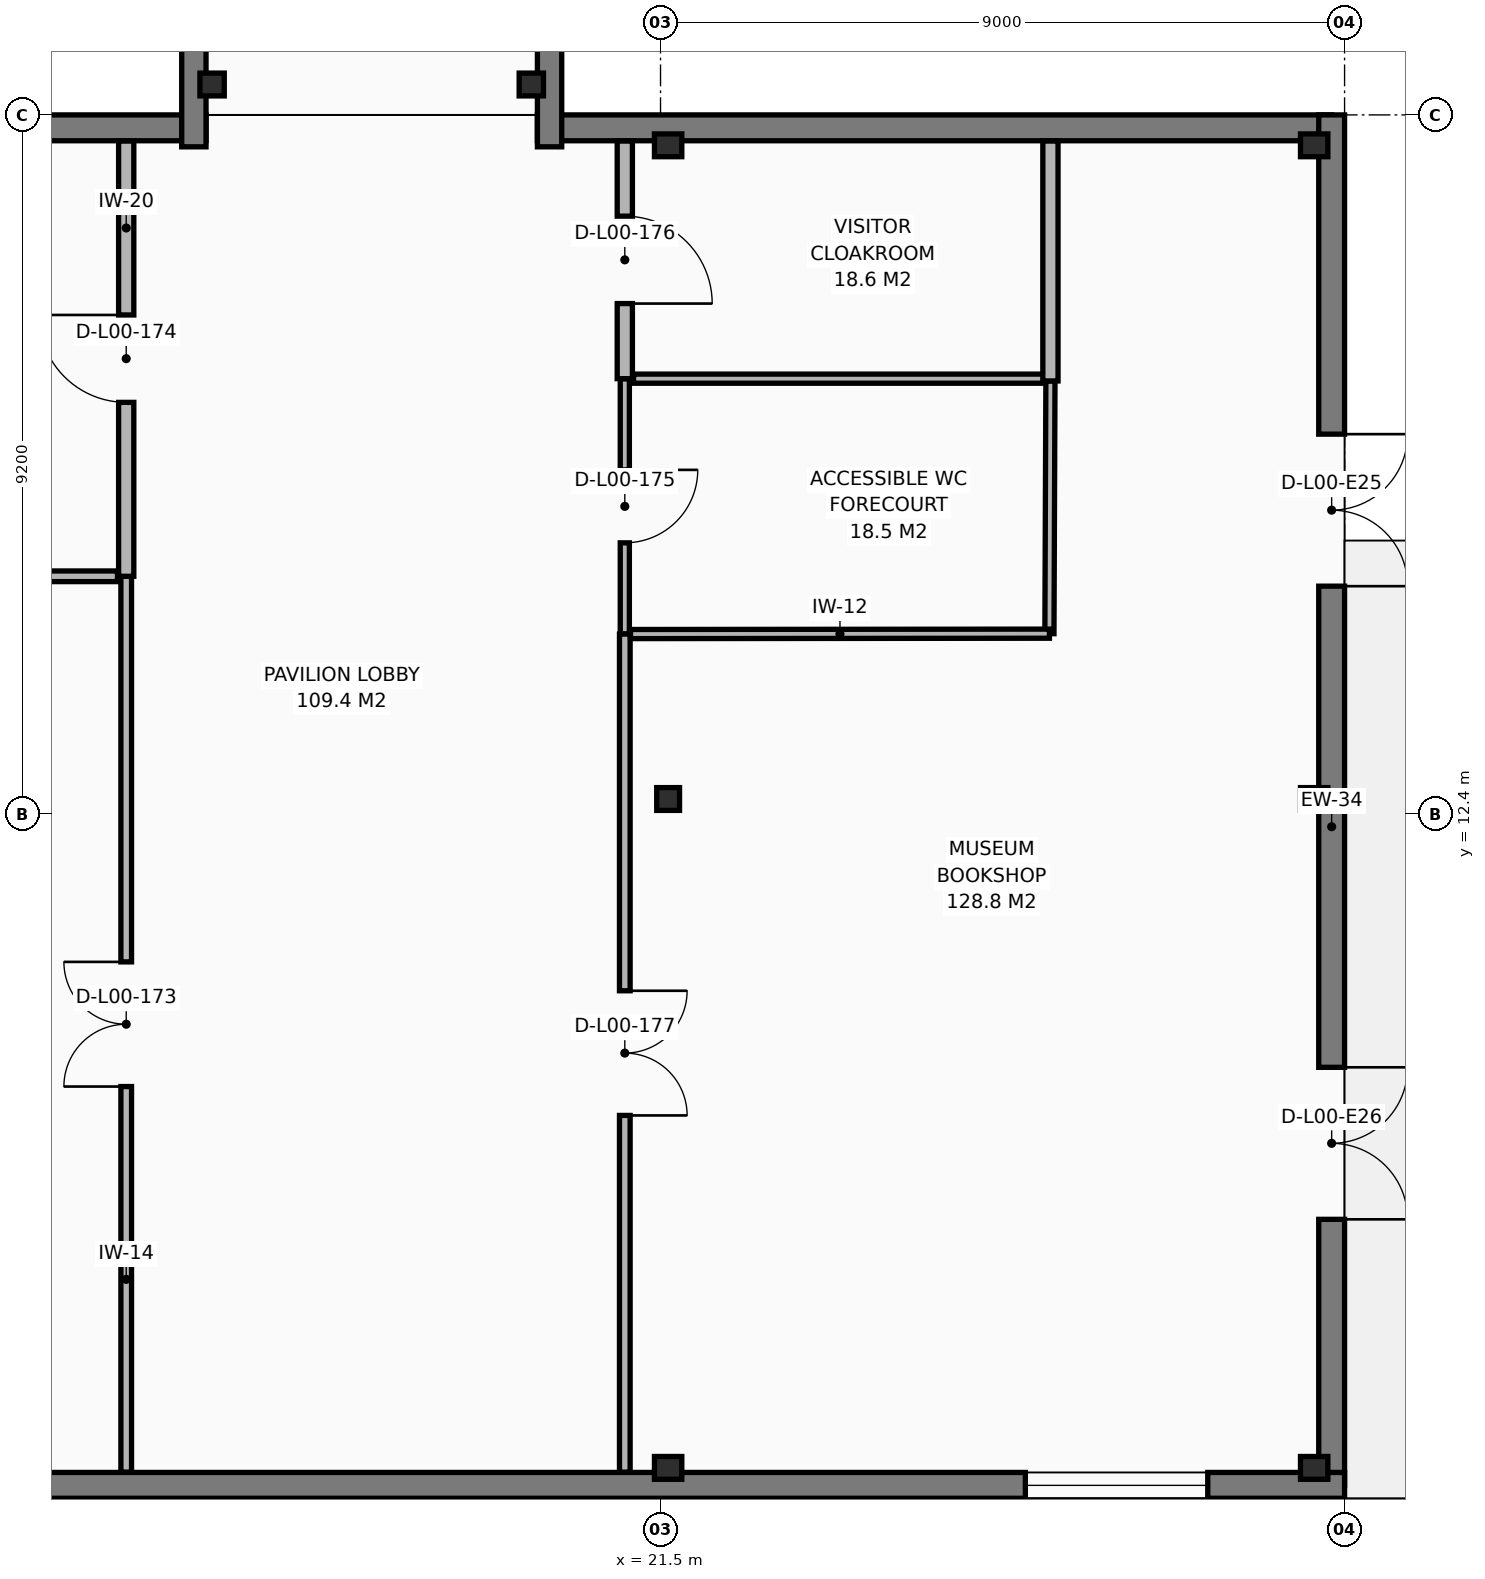
"""IFC4 building model, lengths in metres.
Left out: names, types, materials, properties, quantities, classifications, styles, units other than length and angle.
Written with IfcOpenShell. Run it as: python <this file> out.ifc"""

import sys

from ifc_helpers import new_model, si_unit, direction, frame, frame_2d, origin, origin_2d, place, context, subcontext, project, spatial, rectangle, i_section, extrude, element, fill, save


model = new_model("IFC4")
c1 = context("Model", 3, precision=1e-05, world=origin(), true_north=direction((0.0, 1.0)))
c2 = subcontext(c1, "Body", "Model", "MODEL_VIEW")
j1 = project(units=[si_unit("LENGTHUNIT", "METRE"), si_unit("PLANEANGLEUNIT", "RADIAN")], contexts=[c1])
p1 = place(None, origin())
s1 = spatial("IfcSite", under=j1, at=p1, CompositionType="ELEMENT")
p2 = place(p1, origin())
s2 = spatial("IfcBuilding", under=s1, at=p2, CompositionType="ELEMENT")
p3 = place(p2, origin())
s3 = spatial("IfcBuildingStorey", under=s2, at=p3, CompositionType="ELEMENT", Elevation=0.0)
p4 = place(p3, frame((21.6, 3.8, 0.0), z_axis=(0.0, 0.0, 1.0), x_axis=(1.0, 0.0, 0.0)))
e1 = element("IfcColumn", 1, at=p4, inside=s3, PredefinedType="COLUMN", context=c2, shape_type="SweptSolid", body=[
    extrude(i_section(OverallWidth=0.3, OverallDepth=0.36, WebThickness=0.012, FlangeThickness=0.022, FilletRadius=0.027, at=origin_2d()), origin(), (0.0, 0.0, 1.0), 5.1),
])
p5 = place(p3, frame((21.6, 12.6, 0.0), z_axis=(0.0, 0.0, 1.0), x_axis=(1.0, 0.0, 0.0)))
e2 = element("IfcColumn", 2, at=p5, inside=s3, PredefinedType="COLUMN", context=c2, shape_type="SweptSolid", body=[
    extrude(i_section(OverallWidth=0.3, OverallDepth=0.3, WebThickness=0.011, FlangeThickness=0.019, FilletRadius=0.027, at=origin_2d()), origin(), (0.0, 0.0, 1.0), 5.1),
])
for number, where, z_axis, x_axis in (
    (3, (21.6, 21.2, 0.0), (0.0, 0.0, 1.0), (1.0, 0.0, 0.0)),
    (4, (30.1, 3.8, 0.0), (0.0, 0.0, 1.0), (1.0, 0.0, 0.0)),
    (5, (30.1, 12.6, 0.0), (0.0, 0.0, 1.0), (1.0, 0.0, 0.0)),
    (6, (30.1, 21.2, 0.0), (0.0, 0.0, 1.0), (1.0, 0.0, 0.0)),
):
    element("IfcColumn", number, at=place(p3, frame(where, z_axis=z_axis, x_axis=x_axis)), inside=s3, PredefinedType="COLUMN", context=c2, shape_type="SweptSolid", body=[
        extrude(i_section(OverallWidth=0.3, OverallDepth=0.36, WebThickness=0.012, FlangeThickness=0.022, FilletRadius=0.027, at=origin_2d()), origin(), (0.0, 0.0, 1.0), 5.1),
    ])
for number, where, z_axis, x_axis in (
    (7, (15.6, 22.0, 0.0), (0.0, 0.0, 1.0), (1.0, 0.0, 0.0)),
    (8, (19.8, 22.0, 0.0), (0.0, 0.0, 1.0), (1.0, 0.0, 0.0)),
):
    element("IfcColumn", number, at=place(p3, frame(where, z_axis=z_axis, x_axis=x_axis)), inside=s3, PredefinedType="COLUMN", context=c2, shape_type="SweptSolid", body=[
        extrude(i_section(OverallWidth=0.3, OverallDepth=0.32, WebThickness=0.011, FlangeThickness=0.021, FilletRadius=0.027, at=origin_2d()), origin(), (0.0, 0.0, 1.0), 5.1),
    ])
p6 = place(p3, frame((3.6, 21.43, 0.0), z_axis=(0.0, 0.0, 1.0), x_axis=(1.0, 0.0, 0.0)))
e9 = element("IfcWall", 9, at=p6, inside=s3, PredefinedType="SOLIDWALL", context=c2, shape_type="SweptSolid", body=[
    extrude(rectangle(XDim=11.92, YDim=0.34, at=frame_2d((5.96, 0.0))), origin(), (0.0, 0.0, 1.0), 4.88),
])
p7 = place(p6, frame((1.8, 0.0, 0.85)))
e10 = element("IfcOpeningElement", 10, at=p7, cuts=e9, PredefinedType="OPENING", context=c2, shape_type="SweptSolid", body=[
    extrude(rectangle(XDim=2.4, YDim=1.5, at=frame_2d((1.2, 0.75))), frame((0.0, 0.18, 0.0), z_axis=(0.0, -1.0, 0.0), x_axis=(1.0, 0.0, 0.0)), (0.0, 0.0, 1.0), 0.36),
])
p8 = place(p3, frame((19.88, 21.43, 0.0), z_axis=(0.0, 0.0, 1.0), x_axis=(1.0, 0.0, 0.0)))
e11 = element("IfcWall", 11, at=p8, inside=s3, PredefinedType="SOLIDWALL", context=c2, shape_type="SweptSolid", body=[
    extrude(rectangle(XDim=10.45, YDim=0.34, at=frame_2d((5.225, 0.0))), origin(), (0.0, 0.0, 1.0), 4.88),
])
p9 = place(p3, frame((30.33, 21.6, 0.0), z_axis=(0.0, 0.0, 1.0), x_axis=(0.0, -1.0, 0.0)))
e12 = element("IfcWall", 12, at=p9, inside=s3, PredefinedType="SOLIDWALL", context=c2, shape_type="SweptSolid", body=[
    extrude(rectangle(XDim=18.03, YDim=0.34, at=frame_2d((9.015, 0.0))), origin(), (0.0, 0.0, 1.0), 4.88),
])
p10 = place(p9, frame((4.2, 0.0, 0.0)))
e13 = element("IfcOpeningElement", 13, at=p10, cuts=e12, PredefinedType="OPENING", context=c2, shape_type="SweptSolid", body=[
    extrude(rectangle(XDim=2.0, YDim=2.3, at=frame_2d((1.0, 1.15))), frame((0.0, 0.18, 0.0), z_axis=(0.0, -1.0, 0.0), x_axis=(1.0, 0.0, 0.0)), (0.0, 0.0, 1.0), 0.36),
])
p11 = place(p9, frame((12.53, 0.0, 0.0)))
e14 = element("IfcOpeningElement", 14, at=p11, cuts=e12, PredefinedType="OPENING", context=c2, shape_type="SweptSolid", body=[
    extrude(rectangle(XDim=2.0, YDim=2.3, at=frame_2d((1.0, 1.15))), frame((0.0, 0.18, 0.0), z_axis=(0.0, -1.0, 0.0), x_axis=(1.0, 0.0, 0.0)), (0.0, 0.0, 1.0), 0.36),
])
p12 = place(p3, frame((30.5, 3.57, 0.0), z_axis=(0.0, 0.0, 1.0), x_axis=(-1.0, 0.0, 0.0)))
e15 = element("IfcWall", 15, at=p12, inside=s3, PredefinedType="SOLIDWALL", context=c2, shape_type="SweptSolid", body=[
    extrude(rectangle(XDim=26.73, YDim=0.34, at=frame_2d((13.365, 0.0))), origin(), (0.0, 0.0, 1.0), 4.88),
])
p13 = place(p12, frame((1.8, 0.0, 0.85)))
e16 = element("IfcOpeningElement", 16, at=p13, cuts=e15, PredefinedType="OPENING", context=c2, shape_type="SweptSolid", body=[
    extrude(rectangle(XDim=2.4, YDim=1.5, at=frame_2d((1.2, 0.75))), frame((0.0, 0.18, 0.0), z_axis=(0.0, -1.0, 0.0), x_axis=(1.0, 0.0, 0.0)), (0.0, 0.0, 1.0), 0.36),
])
p14 = place(p3, frame((15.36, 21.18, 0.0), z_axis=(0.0, 0.0, 1.0), x_axis=(0.0, 1.0, 0.0)))
e17 = element("IfcWall", 17, at=p14, inside=s3, PredefinedType="SOLIDWALL", context=c2, shape_type="SweptSolid", body=[
    extrude(rectangle(XDim=18.565, YDim=0.32, at=frame_2d((9.283, 0.0))), origin(), (0.0, 0.0, 1.0), 4.82),
])
p15 = place(p14, frame((8.308, 0.0, 1.12)))
e18 = element("IfcOpeningElement", 18, at=p15, cuts=e17, PredefinedType="OPENING", context=c2, shape_type="SweptSolid", body=[
    extrude(rectangle(XDim=1.95, YDim=1.5, at=frame_2d((0.975, 0.75))), frame((0.0, 0.17, 0.0), z_axis=(0.0, -1.0, 0.0), x_axis=(1.0, 0.0, 0.0)), (0.0, 0.0, 1.0), 0.34),
])
p16 = place(p3, frame((20.04, 39.745, 0.0), z_axis=(0.0, 0.0, 1.0), x_axis=(0.0, -1.0, 0.0)))
e19 = element("IfcWall", 19, at=p16, inside=s3, PredefinedType="SOLIDWALL", context=c2, shape_type="SweptSolid", body=[
    extrude(rectangle(XDim=18.565, YDim=0.32, at=frame_2d((9.283, 0.0))), origin(), (0.0, 0.0, 1.0), 4.82),
])
p17 = place(p16, frame((8.308, 0.0, 1.12)))
e20 = element("IfcOpeningElement", 20, at=p17, cuts=e19, PredefinedType="OPENING", context=c2, shape_type="SweptSolid", body=[
    extrude(rectangle(XDim=1.95, YDim=1.5, at=frame_2d((0.975, 0.75))), frame((0.0, 0.17, 0.0), z_axis=(0.0, -1.0, 0.0), x_axis=(1.0, 0.0, 0.0)), (0.0, 0.0, 1.0), 0.34),
])
p18 = place(p3, frame((14.47, 3.744, 0.0), z_axis=(0.0, 0.0, 1.0), x_axis=(0.0, 1.0, 0.0)))
e21 = element("IfcWall", 21, at=p18, inside=s3, PredefinedType="PARTITIONING", context=c2, shape_type="SweptSolid", body=[
    extrude(rectangle(XDim=11.786, YDim=0.14, at=frame_2d((5.893, 0.0))), origin(), (0.0, 0.0, 1.0), 4.51),
])
p19 = place(p18, frame((5.073, 0.0, 0.0)))
e22 = element("IfcOpeningElement", 22, at=p19, cuts=e21, PredefinedType="OPENING", context=c2, shape_type="SweptSolid", body=[
    extrude(rectangle(XDim=1.64, YDim=2.2, at=frame_2d((0.82, 1.1))), frame((0.0, 0.08, 0.0), z_axis=(0.0, -1.0, 0.0), x_axis=(1.0, 0.0, 0.0)), (0.0, 0.0, 1.0), 0.16),
])
p20 = place(p3, frame((14.47, 15.53, 0.0), z_axis=(0.0, 0.0, 1.0), x_axis=(0.0, 1.0, 0.0)))
e23 = element("IfcWall", 23, at=p20, inside=s3, PredefinedType="PARTITIONING", context=c2, shape_type="SweptSolid", body=[
    extrude(rectangle(XDim=5.726, YDim=0.2, at=frame_2d((2.863, 0.0))), origin(), (0.0, 0.0, 1.0), 4.51),
])
p21 = place(p20, frame((2.288, 0.0, 0.0)))
e24 = element("IfcOpeningElement", 24, at=p21, cuts=e23, PredefinedType="OPENING", context=c2, shape_type="SweptSolid", body=[
    extrude(rectangle(XDim=1.15, YDim=2.15, at=frame_2d((0.575, 1.075))), frame((0.0, 0.11, 0.0), z_axis=(0.0, -1.0, 0.0), x_axis=(1.0, 0.0, 0.0)), (0.0, 0.0, 1.0), 0.22),
])
p22 = place(p3, frame((21.03, 18.13, 0.0), z_axis=(0.0, 0.0, 1.0), x_axis=(0.0, -1.0, 0.0)))
e25 = element("IfcWall", 25, at=p22, inside=s3, PredefinedType="PARTITIONING", context=c2, shape_type="SweptSolid", body=[
    extrude(rectangle(XDim=3.36, YDim=0.12, at=frame_2d((1.68, 0.0))), origin(), (0.0, 0.0, 1.0), 4.87),
])
p23 = place(p22, frame((1.2, 0.0, 0.0)))
e26 = element("IfcOpeningElement", 26, at=p23, cuts=e25, PredefinedType="OPENING", context=c2, shape_type="SweptSolid", body=[
    extrude(rectangle(XDim=0.96, YDim=2.1, at=frame_2d((0.48, 1.05))), frame((0.0, 0.07, 0.0), z_axis=(0.0, -1.0, 0.0), x_axis=(1.0, 0.0, 0.0)), (0.0, 0.0, 1.0), 0.14),
])
p24 = place(p3, frame((21.03, 21.256, 0.0), z_axis=(0.0, 0.0, 1.0), x_axis=(0.0, -1.0, 0.0)))
e27 = element("IfcWall", 27, at=p24, inside=s3, PredefinedType="PARTITIONING", context=c2, shape_type="SweptSolid", body=[
    extrude(rectangle(XDim=3.126, YDim=0.2, at=frame_2d((1.563, 0.0))), origin(), (0.0, 0.0, 1.0), 4.51),
])
p25 = place(p24, frame((0.988, 0.0, 0.0)))
e28 = element("IfcOpeningElement", 28, at=p25, cuts=e27, PredefinedType="OPENING", context=c2, shape_type="SweptSolid", body=[
    extrude(rectangle(XDim=1.15, YDim=2.15, at=frame_2d((0.575, 1.075))), frame((0.0, 0.11, 0.0), z_axis=(0.0, -1.0, 0.0), x_axis=(1.0, 0.0, 0.0)), (0.0, 0.0, 1.0), 0.22),
])
p26 = place(p3, frame((21.03, 14.77, 0.0), z_axis=(0.0, 0.0, 1.0), x_axis=(0.0, -1.0, 0.0)))
e29 = element("IfcWall", 29, at=p26, inside=s3, PredefinedType="PARTITIONING", context=c2, shape_type="SweptSolid", body=[
    extrude(rectangle(XDim=11.026, YDim=0.14, at=frame_2d((5.513, 0.0))), origin(), (0.0, 0.0, 1.0), 4.51),
])
p27 = place(p26, frame((4.693, 0.0, 0.0)))
e30 = element("IfcOpeningElement", 30, at=p27, cuts=e29, PredefinedType="OPENING", context=c2, shape_type="SweptSolid", body=[
    extrude(rectangle(XDim=1.64, YDim=2.2, at=frame_2d((0.82, 1.1))), frame((0.0, 0.08, 0.0), z_axis=(0.0, -1.0, 0.0), x_axis=(1.0, 0.0, 0.0)), (0.0, 0.0, 1.0), 0.16),
])
p28 = place(p3, frame((3.944, 15.53, 0.0), z_axis=(0.0, 0.0, 1.0), x_axis=(1.0, 0.0, 0.0)))
e31 = element("IfcWall", 31, at=p28, inside=s3, PredefinedType="PARTITIONING", context=c2, shape_type="SweptSolid", body=[
    extrude(rectangle(XDim=10.411, YDim=0.14, at=frame_2d((5.206, 0.0))), origin(), (0.0, 0.0, 1.0), 4.51),
])
p29 = place(p3, frame((21.145, 18.13, 0.0), z_axis=(0.0, 0.0, 1.0), x_axis=(1.0, 0.0, 0.0)))
e32 = element("IfcWall", 32, at=p29, inside=s3, PredefinedType="PARTITIONING", context=c2, shape_type="SweptSolid", body=[
    extrude(rectangle(XDim=5.455, YDim=0.12, at=frame_2d((2.728, 0.0))), origin(), (0.0, 0.0, 1.0), 4.57),
])
p30 = place(p3, frame((26.63, 18.1, 0.0), z_axis=(0.0, 0.0, 1.0), x_axis=(-0.003965017661, -0.999992139287, 0.0)))
e33 = element("IfcWall", 33, at=p30, inside=s3, PredefinedType="PARTITIONING", context=c2, shape_type="SweptSolid", body=[
    extrude(rectangle(XDim=3.325, YDim=0.12, at=frame_2d((1.663, 0.0))), origin(), (0.0, 0.0, 1.0), 4.87),
])
p31 = place(p3, frame((26.617, 14.775, 0.0), z_axis=(0.0, 0.0, 1.0), x_axis=(-0.999999567372, -0.000930190951, 0.0)))
e34 = element("IfcWall", 34, at=p31, inside=s3, PredefinedType="PARTITIONING", context=c2, shape_type="SweptSolid", body=[
    extrude(rectangle(XDim=5.512, YDim=0.12, at=frame_2d((2.756, 0.0))), origin(), (0.0, 0.0, 1.0), 4.57),
])
p32 = place(p3, frame((26.63, 21.256, 0.0), z_axis=(0.0, 0.0, 1.0), x_axis=(0.0, -1.0, 0.0)))
e35 = element("IfcWall", 35, at=p32, inside=s3, PredefinedType="PARTITIONING", context=c2, shape_type="SweptSolid", body=[
    extrude(rectangle(XDim=3.156, YDim=0.2, at=frame_2d((1.578, 0.0))), origin(), (0.0, 0.0, 1.0), 4.51),
])
p33 = place(p10, origin())
e36 = element("IfcDoor", 36, at=p33, inside=s3, OperationType="DOUBLE_DOOR_SINGLE_SWING", PredefinedType="DOOR", context=c2, shape_type="SweptSolid", body=[
    extrude(rectangle(XDim=2.0, YDim=2.3, at=frame_2d((1.0, 1.15))), frame((0.0, 0.025, 0.0), z_axis=(0.0, -1.0, 0.0), x_axis=(1.0, 0.0, 0.0)), (0.0, 0.0, 1.0), 0.05),
])
fill(e13, e36)
p34 = place(p11, origin())
e37 = element("IfcDoor", 37, at=p34, inside=s3, OperationType="DOUBLE_DOOR_SINGLE_SWING", PredefinedType="DOOR", context=c2, shape_type="SweptSolid", body=[
    extrude(rectangle(XDim=2.0, YDim=2.3, at=frame_2d((1.0, 1.15))), frame((0.0, 0.025, 0.0), z_axis=(0.0, -1.0, 0.0), x_axis=(1.0, 0.0, 0.0)), (0.0, 0.0, 1.0), 0.05),
])
fill(e14, e37)
p35 = place(p13, origin())
e38 = element("IfcWindow", 38, at=p35, inside=s3, PartitioningType="SINGLE_PANEL", PredefinedType="WINDOW", context=c2, shape_type="SweptSolid", body=[
    extrude(rectangle(XDim=2.4, YDim=1.5, at=frame_2d((1.2, 0.75))), frame((0.0, 0.03, 0.0), z_axis=(0.0, -1.0, 0.0), x_axis=(1.0, 0.0, 0.0)), (0.0, 0.0, 1.0), 0.06),
])
fill(e16, e38)
p36 = place(p19, origin())
e39 = element("IfcDoor", 39, at=p36, inside=s3, OperationType="DOUBLE_DOOR_SINGLE_SWING", PredefinedType="DOOR", context=c2, shape_type="SweptSolid", body=[
    extrude(rectangle(XDim=1.64, YDim=2.2, at=frame_2d((0.82, 1.1))), frame((0.0, 0.025, 0.0), z_axis=(0.0, -1.0, 0.0), x_axis=(1.0, 0.0, 0.0)), (0.0, 0.0, 1.0), 0.05),
])
fill(e22, e39)
p37 = place(p21, origin())
e40 = element("IfcDoor", 40, at=p37, inside=s3, OperationType="SINGLE_SWING_RIGHT", PredefinedType="DOOR", context=c2, shape_type="SweptSolid", body=[
    extrude(rectangle(XDim=1.15, YDim=2.15, at=frame_2d((0.575, 1.075))), frame((0.0, 0.025, 0.0), z_axis=(0.0, -1.0, 0.0), x_axis=(1.0, 0.0, 0.0)), (0.0, 0.0, 1.0), 0.05),
])
fill(e24, e40)
p38 = place(p23, origin())
e41 = element("IfcDoor", 41, at=p38, inside=s3, OperationType="SINGLE_SWING_LEFT", PredefinedType="DOOR", context=c2, shape_type="SweptSolid", body=[
    extrude(rectangle(XDim=0.96, YDim=2.1, at=frame_2d((0.48, 1.05))), frame((0.0, 0.025, 0.0), z_axis=(0.0, -1.0, 0.0), x_axis=(1.0, 0.0, 0.0)), (0.0, 0.0, 1.0), 0.05),
])
fill(e26, e41)
p39 = place(p25, origin())
e42 = element("IfcDoor", 42, at=p39, inside=s3, OperationType="SINGLE_SWING_RIGHT", PredefinedType="DOOR", context=c2, shape_type="SweptSolid", body=[
    extrude(rectangle(XDim=1.15, YDim=2.15, at=frame_2d((0.575, 1.075))), frame((0.0, 0.025, 0.0), z_axis=(0.0, -1.0, 0.0), x_axis=(1.0, 0.0, 0.0)), (0.0, 0.0, 1.0), 0.05),
])
fill(e28, e42)
p40 = place(p27, origin())
e43 = element("IfcDoor", 43, at=p40, inside=s3, OperationType="DOUBLE_DOOR_SINGLE_SWING", PredefinedType="DOOR", context=c2, shape_type="SweptSolid", body=[
    extrude(rectangle(XDim=1.64, YDim=2.2, at=frame_2d((0.82, 1.1))), frame((0.0, 0.025, 0.0), z_axis=(0.0, -1.0, 0.0), x_axis=(1.0, 0.0, 0.0)), (0.0, 0.0, 1.0), 0.05),
])
fill(e30, e43)
save(model, sys.argv[1])
